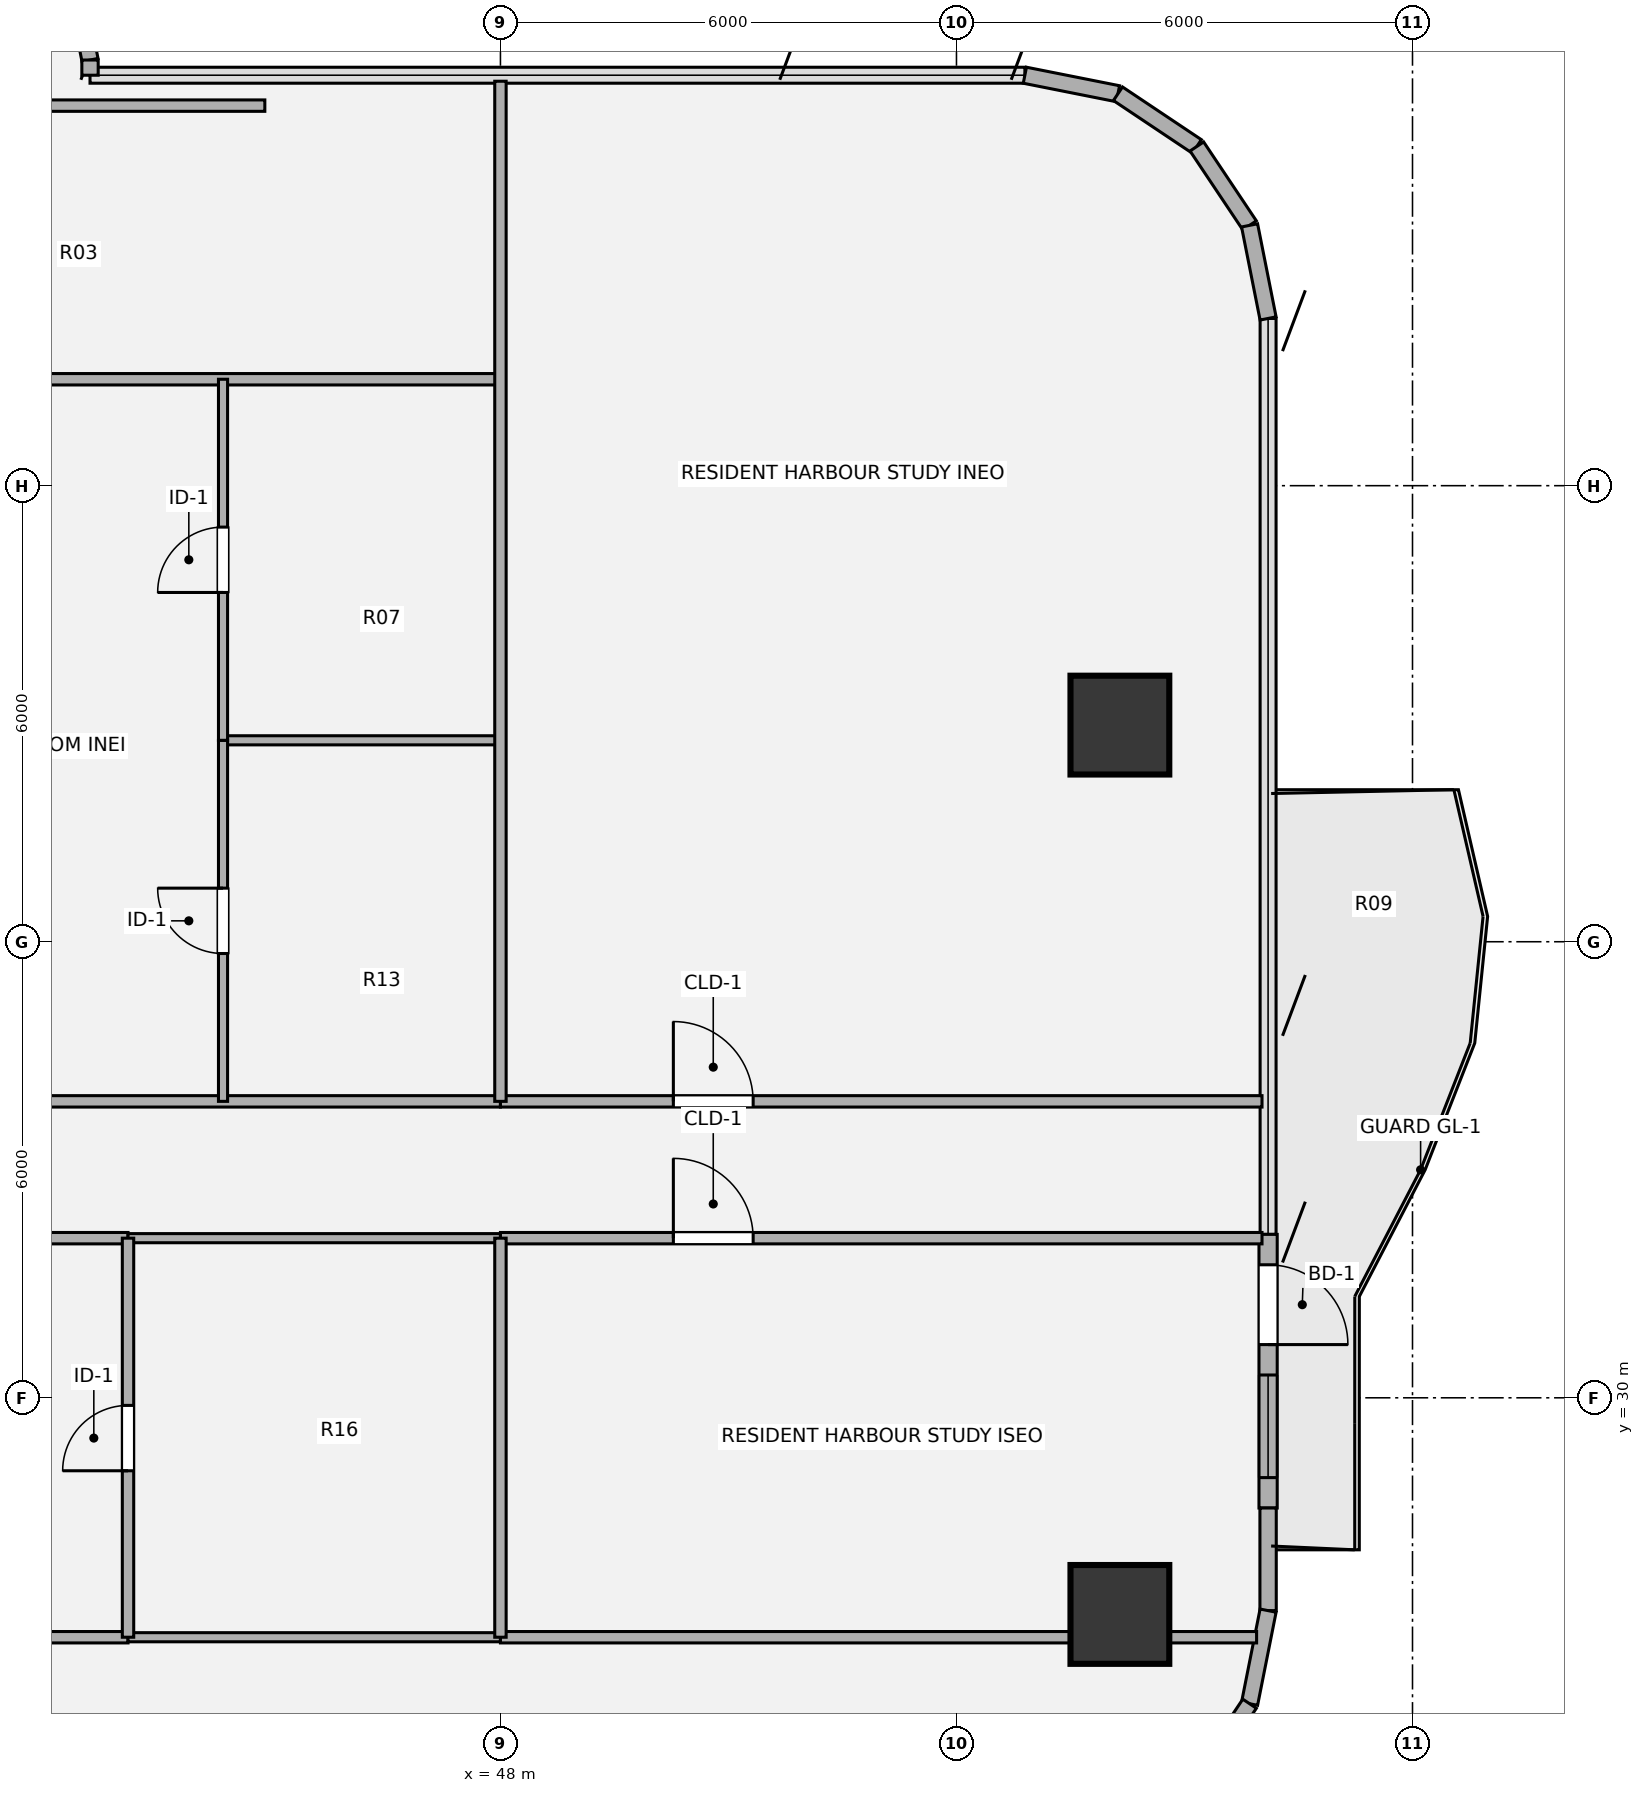
"""IFC4 building model, lengths in metres.
Left out: names, types, materials, properties, quantities, classifications, styles, units other than length and angle.
Written with IfcOpenShell. Run it as: python <this file> out.ifc"""

import sys

from ifc_helpers import new_model, si_unit, direction, frame, frame_2d, origin, origin_2d, place, context, subcontext, project, spatial, rectangle, hollow_circle, extrude, source, transform, mapped, element, fill, save


model = new_model("IFC4")
c1 = context("Model", 3, precision=1e-05, world=origin(), true_north=direction((0.0, 1.0)))
c2 = subcontext(c1, "Body", "Model", "MODEL_VIEW")
j1 = project(units=[si_unit("LENGTHUNIT", "METRE"), si_unit("PLANEANGLEUNIT", "RADIAN")], contexts=[c1])
p1 = place(None, origin())
s1 = spatial("IfcSite", under=j1, at=p1, CompositionType="ELEMENT")
p2 = place(p1, origin())
s2 = spatial("IfcBuilding", under=s1, at=p2, CompositionType="ELEMENT")
p3 = place(p2, frame((0.0, 0.0, 97.38)))
s3 = spatial("IfcBuildingStorey", under=s2, at=p3, CompositionType="ELEMENT", Elevation=97.38)
m1 = source(origin(), c2, "Body", "SweptSolid", [
    extrude(hollow_circle(Radius=0.65, WallThickness=0.045, at=origin_2d()), origin(), (0.0, 0.0, 1.0), 3.78),
])
for number, where, z_axis, x_axis in (
    (1, (56.15, 27.15, 0.0), (0.0, 0.0, 1.0), (1.0, 0.0, 0.0)),
    (2, (56.15, 38.85, 0.0), (0.0, 0.0, 1.0), (1.0, 0.0, 0.0)),
):
    element("IfcColumn", number, at=place(p3, frame(where, z_axis=z_axis, x_axis=x_axis)), inside=s3, PredefinedType="COLUMN", context=c2, shape_type="MappedRepresentation", body=[
        mapped(m1, transform((0.0, 0.0, 0.0), x_axis=(1.0, 0.0, 0.0), y_axis=(0.0, 1.0, 0.0), z_axis=(0.0, 0.0, 1.0), scale=1.0)),
    ])
p4 = place(p3, frame((42.387, 48.671, 0.0), z_axis=(0.0, 0.0, 1.0), x_axis=(0.195127417394, -0.980777900945, 0.0)))
e3 = element("IfcWall", 3, at=p4, inside=s3, PredefinedType="SOLIDWALL", context=c2, shape_type="SweptSolid", body=[
    extrude(rectangle(XDim=1.092, YDim=0.215, at=frame_2d((0.546, 0.0))), origin(), (0.0, 0.0, 1.0), 3.53),
])
p5 = place(p3, frame((42.6, 47.6, 0.0), z_axis=(0.0, 0.0, 1.0), x_axis=(0.0, -1.0, 0.0)))
e4 = element("IfcWall", 4, at=p5, inside=s3, PredefinedType="SOLIDWALL", context=c2, shape_type="SweptSolid", body=[
    extrude(rectangle(XDim=0.2, YDim=0.215, at=frame_2d((0.1, 0.0))), origin(), (0.0, 0.0, 1.0), 3.53),
])
for number, where, z_axis, x_axis in (
    (5, (54.9, 47.4, 0.0), (0.0, 0.0, 1.0), (0.981, -0.195, 0.0)),
    (6, (56.125, 47.156, 0.0), (0.0, 0.0, 1.0), (0.831, -0.556, 0.0)),
    (7, (57.163, 46.463, 0.0), (0.0, 0.0, 1.0), (0.556, -0.831, 0.0)),
    (8, (57.856, 45.425, 0.0), (0.0, 0.0, 1.0), (0.195, -0.981, 0.0)),
):
    element("IfcWall", number, at=place(p3, frame(where, z_axis=z_axis, x_axis=x_axis)), inside=s3, PredefinedType="SOLIDWALL", context=c2, shape_type="SweptSolid", body=[
        extrude(rectangle(XDim=1.249, YDim=0.215, at=frame_2d((0.624, 0.0))), origin(), (0.0, 0.0, 1.0), 3.53),
    ])
p6 = place(p3, frame((58.1, 32.15, 0.0), z_axis=(0.0, 0.0, 1.0), x_axis=(0.0, -1.0, 0.0)))
e9 = element("IfcWall", 9, at=p6, inside=s3, PredefinedType="SOLIDWALL", context=c2, shape_type="SweptSolid", body=[
    extrude(rectangle(XDim=3.6, YDim=0.24, at=frame_2d((1.8, 0.0))), origin(), (0.0, 0.0, 1.0), 3.53),
])
p7 = place(p6, frame((0.4, 0.0, 0.0)))
e10 = element("IfcOpeningElement", 10, at=p7, cuts=e9, PredefinedType="OPENING", context=c2, shape_type="SweptSolid", body=[
    extrude(rectangle(XDim=1.05, YDim=2.15, at=origin_2d()), frame((0.525, 0.13, 1.075), z_axis=(0.0, -1.0, 0.0), x_axis=(1.0, 0.0, 0.0)), (0.0, 0.0, 1.0), 0.26),
])
p8 = place(p6, frame((1.85, 0.0, 0.85)))
e11 = element("IfcOpeningElement", 11, at=p8, cuts=e9, PredefinedType="OPENING", context=c2, shape_type="SweptSolid", body=[
    extrude(rectangle(XDim=1.35, YDim=1.35, at=origin_2d()), frame((0.675, 0.13, 0.675), z_axis=(0.0, -1.0, 0.0), x_axis=(1.0, 0.0, 0.0)), (0.0, 0.0, 1.0), 0.26),
])
p9 = place(p3, frame((58.1, 28.55, 0.0), z_axis=(0.0, 0.0, 1.0), x_axis=(0.0, -1.0, 0.0)))
e12 = element("IfcWall", 12, at=p9, inside=s3, PredefinedType="SOLIDWALL", context=c2, shape_type="SweptSolid", body=[
    extrude(rectangle(XDim=1.35, YDim=0.215, at=frame_2d((0.675, 0.0))), origin(), (0.0, 0.0, 1.0), 3.53),
])
for number, where, z_axis, x_axis in (
    (13, (58.1, 27.2, 0.0), (0.0, 0.0, 1.0), (-0.195, -0.981, 0.0)),
    (14, (57.856, 25.975, 0.0), (0.0, 0.0, 1.0), (-0.556, -0.831, 0.0)),
):
    element("IfcWall", number, at=place(p3, frame(where, z_axis=z_axis, x_axis=x_axis)), inside=s3, PredefinedType="SOLIDWALL", context=c2, shape_type="SweptSolid", body=[
        extrude(rectangle(XDim=1.249, YDim=0.215, at=frame_2d((0.624, 0.0))), origin(), (0.0, 0.0, 1.0), 3.53),
    ])
p10 = place(p3, frame((36.9, 26.85, 0.0), z_axis=(0.0, 0.0, 1.0), x_axis=(1.0, 0.0, 0.0)))
e15 = element("IfcWall", 15, at=p10, inside=s3, PredefinedType="PARTITIONING", context=c2, shape_type="SweptSolid", body=[
    extrude(rectangle(XDim=6.2, YDim=0.15, at=frame_2d((3.1, 0.0))), origin(), (0.0, 0.0, 1.0), 2.903),
])
p11 = place(p3, frame((43.1, 26.85, 0.0), z_axis=(0.0, 0.0, 1.0), x_axis=(1.0, 0.0, 0.0)))
e16 = element("IfcWall", 16, at=p11, inside=s3, PredefinedType="PARTITIONING", context=c2, shape_type="SweptSolid", body=[
    extrude(rectangle(XDim=4.9, YDim=0.12, at=frame_2d((2.45, 0.0))), origin(), (0.0, 0.0, 1.0), 3.055),
])
p12 = place(p3, frame((48.0, 26.85, 0.0), z_axis=(0.0, 0.0, 1.0), x_axis=(1.0, 0.0, 0.0)))
e17 = element("IfcWall", 17, at=p12, inside=s3, PredefinedType="PARTITIONING", context=c2, shape_type="SweptSolid", body=[
    extrude(rectangle(XDim=9.949, YDim=0.15, at=frame_2d((4.974, 0.0))), origin(), (0.0, 0.0, 1.0), 3.055),
])
p13 = place(p3, frame((36.9, 32.1, 0.0), z_axis=(0.0, 0.0, 1.0), x_axis=(1.0, 0.0, 0.0)))
e18 = element("IfcWall", 18, at=p13, inside=s3, PredefinedType="PARTITIONING", context=c2, shape_type="SweptSolid", body=[
    extrude(rectangle(XDim=6.2, YDim=0.15, at=frame_2d((3.1, 0.0))), origin(), (0.0, 0.0, 1.0), 2.982),
])
p14 = place(p3, frame((43.1, 32.1, 0.0), z_axis=(0.0, 0.0, 1.0), x_axis=(1.0, 0.0, 0.0)))
e19 = element("IfcWall", 19, at=p14, inside=s3, PredefinedType="PARTITIONING", context=c2, shape_type="SweptSolid", body=[
    extrude(rectangle(XDim=4.9, YDim=0.12, at=frame_2d((2.45, 0.0))), origin(), (0.0, 0.0, 1.0), 2.982),
])
p15 = place(p3, frame((48.0, 32.1, 0.0), z_axis=(0.0, 0.0, 1.0), x_axis=(1.0, 0.0, 0.0)))
e20 = element("IfcWall", 20, at=p15, inside=s3, PredefinedType="PARTITIONING", context=c2, shape_type="SweptSolid", body=[
    extrude(rectangle(XDim=10.02, YDim=0.15, at=frame_2d((5.01, 0.0))), origin(), (0.0, 0.0, 1.0), 2.982),
])
p16 = place(p15, frame((2.275, 0.0, 0.0)))
e21 = element("IfcOpeningElement", 21, at=p16, cuts=e20, PredefinedType="OPENING", context=c2, shape_type="SweptSolid", body=[
    extrude(rectangle(XDim=1.05, YDim=2.1, at=origin_2d()), frame((0.525, 0.085, 1.05), z_axis=(0.0, -1.0, 0.0), x_axis=(1.0, 0.0, 0.0)), (0.0, 0.0, 1.0), 0.17),
])
p17 = place(p3, frame((36.9, 33.9, 0.0), z_axis=(0.0, 0.0, 1.0), x_axis=(1.0, 0.0, 0.0)))
e22 = element("IfcWall", 22, at=p17, inside=s3, PredefinedType="PARTITIONING", context=c2, shape_type="SweptSolid", body=[
    extrude(rectangle(XDim=11.1, YDim=0.15, at=frame_2d((5.55, 0.0))), origin(), (0.0, 0.0, 1.0), 2.982),
])
p18 = place(p3, frame((48.0, 33.9, 0.0), z_axis=(0.0, 0.0, 1.0), x_axis=(1.0, 0.0, 0.0)))
e23 = element("IfcWall", 23, at=p18, inside=s3, PredefinedType="PARTITIONING", context=c2, shape_type="SweptSolid", body=[
    extrude(rectangle(XDim=10.02, YDim=0.15, at=frame_2d((5.01, 0.0))), origin(), (0.0, 0.0, 1.0), 2.982),
])
p19 = place(p18, frame((2.275, 0.0, 0.0)))
e24 = element("IfcOpeningElement", 24, at=p19, cuts=e23, PredefinedType="OPENING", context=c2, shape_type="SweptSolid", body=[
    extrude(rectangle(XDim=1.05, YDim=2.1, at=origin_2d()), frame((0.525, 0.085, 1.05), z_axis=(0.0, -1.0, 0.0), x_axis=(1.0, 0.0, 0.0)), (0.0, 0.0, 1.0), 0.17),
])
p20 = place(p3, frame((44.35, 38.65, 0.0), z_axis=(0.0, 0.0, 1.0), x_axis=(1.0, 0.0, 0.0)))
e25 = element("IfcWall", 25, at=p20, inside=s3, PredefinedType="PARTITIONING", context=c2, shape_type="SweptSolid", body=[
    extrude(rectangle(XDim=3.65, YDim=0.12, at=frame_2d((1.825, 0.0))), origin(), (0.0, 0.0, 1.0), 2.903),
])
p21 = place(p3, frame((36.9, 43.4, 0.0), z_axis=(0.0, 0.0, 1.0), x_axis=(1.0, 0.0, 0.0)))
e26 = element("IfcWall", 26, at=p21, inside=s3, PredefinedType="PARTITIONING", context=c2, shape_type="SweptSolid", body=[
    extrude(rectangle(XDim=11.1, YDim=0.15, at=frame_2d((5.55, 0.0))), origin(), (0.0, 0.0, 1.0), 3.308),
])
p22 = place(p3, frame((27.1, 47.0, 0.0), z_axis=(0.0, 0.0, 1.0), x_axis=(1.0, 0.0, 0.0)))
e27 = element("IfcWall", 27, at=p22, inside=s3, PredefinedType="PARTITIONING", context=c2, shape_type="SweptSolid", body=[
    extrude(rectangle(XDim=17.8, YDim=0.15, at=frame_2d((8.9, 0.0))), origin(), (0.0, 0.0, 1.0), 3.308),
])
p23 = place(p22, frame((8.375, 0.0, 0.0)))
e28 = element("IfcOpeningElement", 28, at=p23, cuts=e27, PredefinedType="OPENING", context=c2, shape_type="SweptSolid", body=[
    extrude(rectangle(XDim=1.05, YDim=2.1, at=origin_2d()), frame((0.525, 0.085, 1.05), z_axis=(0.0, -1.0, 0.0), x_axis=(1.0, 0.0, 0.0)), (0.0, 0.0, 1.0), 0.17),
])
p24 = place(p3, frame((43.1, 26.85, 0.0), z_axis=(0.0, 0.0, 1.0), x_axis=(0.0, 1.0, 0.0)))
e29 = element("IfcWall", 29, at=p24, inside=s3, PredefinedType="PARTITIONING", context=c2, shape_type="SweptSolid", body=[
    extrude(rectangle(XDim=5.25, YDim=0.15, at=frame_2d((2.625, 0.0))), origin(), (0.0, 0.0, 1.0), 3.5),
])
p25 = place(p24, frame((2.19, 0.0, 0.0)))
e30 = element("IfcOpeningElement", 30, at=p25, cuts=e29, PredefinedType="OPENING", context=c2, shape_type="SweptSolid", body=[
    extrude(rectangle(XDim=0.86, YDim=2.1, at=origin_2d()), frame((0.43, 0.085, 1.05), z_axis=(0.0, -1.0, 0.0), x_axis=(1.0, 0.0, 0.0)), (0.0, 0.0, 1.0), 0.17),
])
p26 = place(p3, frame((44.35, 33.9, 0.0), z_axis=(0.0, 0.0, 1.0), x_axis=(0.0, 1.0, 0.0)))
e31 = element("IfcWall", 31, at=p26, inside=s3, PredefinedType="PARTITIONING", context=c2, shape_type="SweptSolid", body=[
    extrude(rectangle(XDim=4.75, YDim=0.12, at=frame_2d((2.375, 0.0))), origin(), (0.0, 0.0, 1.0), 3.5),
])
p27 = place(p26, frame((1.945, 0.0, 0.0)))
e32 = element("IfcOpeningElement", 32, at=p27, cuts=e31, PredefinedType="OPENING", context=c2, shape_type="SweptSolid", body=[
    extrude(rectangle(XDim=0.86, YDim=2.1, at=origin_2d()), frame((0.43, 0.07, 1.05), z_axis=(0.0, -1.0, 0.0), x_axis=(1.0, 0.0, 0.0)), (0.0, 0.0, 1.0), 0.14),
])
p28 = place(p3, frame((44.35, 38.65, 0.0), z_axis=(0.0, 0.0, 1.0), x_axis=(0.0, 1.0, 0.0)))
e33 = element("IfcWall", 33, at=p28, inside=s3, PredefinedType="PARTITIONING", context=c2, shape_type="SweptSolid", body=[
    extrude(rectangle(XDim=4.75, YDim=0.12, at=frame_2d((2.375, 0.0))), origin(), (0.0, 0.0, 1.0), 3.5),
])
p29 = place(p28, frame((1.945, 0.0, 0.0)))
e34 = element("IfcOpeningElement", 34, at=p29, cuts=e33, PredefinedType="OPENING", context=c2, shape_type="SweptSolid", body=[
    extrude(rectangle(XDim=0.86, YDim=2.1, at=origin_2d()), frame((0.43, 0.07, 1.05), z_axis=(0.0, -1.0, 0.0), x_axis=(1.0, 0.0, 0.0)), (0.0, 0.0, 1.0), 0.14),
])
p30 = place(p3, frame((48.0, 26.85, 0.0), z_axis=(0.0, 0.0, 1.0), x_axis=(0.0, 1.0, 0.0)))
e35 = element("IfcWall", 35, at=p30, inside=s3, PredefinedType="PARTITIONING", context=c2, shape_type="SweptSolid", body=[
    extrude(rectangle(XDim=5.25, YDim=0.15, at=frame_2d((2.625, 0.0))), origin(), (0.0, 0.0, 1.0), 3.5),
])
p31 = place(p3, frame((48.0, 33.9, 0.0), z_axis=(0.0, 0.0, 1.0), x_axis=(0.0, 1.0, 0.0)))
e36 = element("IfcWall", 36, at=p31, inside=s3, PredefinedType="PARTITIONING", context=c2, shape_type="SweptSolid", body=[
    extrude(rectangle(XDim=13.421, YDim=0.15, at=frame_2d((6.71, 0.0))), origin(), (0.0, 0.0, 1.0), 3.5),
])
m2 = source(origin(), c2, "Body", "SweptSolid", [
    extrude(rectangle(XDim=1.05, YDim=2.15, at=origin_2d()), frame((0.525, 0.025, 1.075), z_axis=(0.0, -1.0, 0.0), x_axis=(1.0, 0.0, 0.0)), (0.0, 0.0, 1.0), 0.05),
])
p32 = place(p7, origin())
e37 = element("IfcDoor", 37, at=p32, inside=s3, OperationType="SINGLE_SWING_RIGHT", PredefinedType="DOOR", context=c2, shape_type="MappedRepresentation", body=[
    mapped(m2, transform((0.0, 0.0, 0.0), x_axis=(1.0, 0.0, 0.0), y_axis=(0.0, 1.0, 0.0), z_axis=(0.0, 0.0, 1.0), scale=1.0)),
])
fill(e10, e37)
m3 = source(origin(), c2, "Body", "SweptSolid", [
    extrude(rectangle(XDim=1.35, YDim=1.35, at=origin_2d()), frame((0.675, 0.03, 0.675), z_axis=(0.0, -1.0, 0.0), x_axis=(1.0, 0.0, 0.0)), (0.0, 0.0, 1.0), 0.06),
])
p33 = place(p8, origin())
e38 = element("IfcWindow", 38, at=p33, inside=s3, PartitioningType="SINGLE_PANEL", PredefinedType="WINDOW", context=c2, shape_type="MappedRepresentation", body=[
    mapped(m3, transform((0.0, 0.0, 0.0), x_axis=(1.0, 0.0, 0.0), y_axis=(0.0, 1.0, 0.0), z_axis=(0.0, 0.0, 1.0), scale=1.0)),
])
fill(e11, e38)
m4 = source(origin(), c2, "Body", "SweptSolid", [
    extrude(rectangle(XDim=1.05, YDim=2.1, at=origin_2d()), frame((0.525, 0.025, 1.05), z_axis=(0.0, -1.0, 0.0), x_axis=(1.0, 0.0, 0.0)), (0.0, 0.0, 1.0), 0.05),
])
p34 = place(p16, origin())
e39 = element("IfcDoor", 39, at=p34, inside=s3, OperationType="SINGLE_SWING_LEFT", PredefinedType="DOOR", context=c2, shape_type="MappedRepresentation", body=[
    mapped(m4, transform((0.0, 0.0, 0.0), x_axis=(1.0, 0.0, 0.0), y_axis=(0.0, 1.0, 0.0), z_axis=(0.0, 0.0, 1.0), scale=1.0)),
])
fill(e21, e39)
p35 = place(p19, origin())
e40 = element("IfcDoor", 40, at=p35, inside=s3, OperationType="SINGLE_SWING_LEFT", PredefinedType="DOOR", context=c2, shape_type="MappedRepresentation", body=[
    mapped(m4, transform((0.0, 0.0, 0.0), x_axis=(1.0, 0.0, 0.0), y_axis=(0.0, 1.0, 0.0), z_axis=(0.0, 0.0, 1.0), scale=1.0)),
])
fill(e24, e40)
m5 = source(origin(), c2, "Body", "SweptSolid", [
    extrude(rectangle(XDim=0.86, YDim=2.1, at=origin_2d()), frame((0.43, 0.025, 1.05), z_axis=(0.0, -1.0, 0.0), x_axis=(1.0, 0.0, 0.0)), (0.0, 0.0, 1.0), 0.05),
])
p36 = place(p25, origin())
e41 = element("IfcDoor", 41, at=p36, inside=s3, OperationType="SINGLE_SWING_LEFT", PredefinedType="DOOR", context=c2, shape_type="MappedRepresentation", body=[
    mapped(m5, transform((0.0, 0.0, 0.0), x_axis=(1.0, 0.0, 0.0), y_axis=(0.0, 1.0, 0.0), z_axis=(0.0, 0.0, 1.0), scale=1.0)),
])
fill(e30, e41)
p37 = place(p27, origin())
e42 = element("IfcDoor", 42, at=p37, inside=s3, OperationType="SINGLE_SWING_RIGHT", PredefinedType="DOOR", context=c2, shape_type="MappedRepresentation", body=[
    mapped(m5, transform((0.0, 0.0, 0.0), x_axis=(1.0, 0.0, 0.0), y_axis=(0.0, 1.0, 0.0), z_axis=(0.0, 0.0, 1.0), scale=1.0)),
])
fill(e32, e42)
p38 = place(p29, origin())
e43 = element("IfcDoor", 43, at=p38, inside=s3, OperationType="SINGLE_SWING_LEFT", PredefinedType="DOOR", context=c2, shape_type="MappedRepresentation", body=[
    mapped(m5, transform((0.0, 0.0, 0.0), x_axis=(1.0, 0.0, 0.0), y_axis=(0.0, 1.0, 0.0), z_axis=(0.0, 0.0, 1.0), scale=1.0)),
])
fill(e34, e43)
save(model, sys.argv[1])
